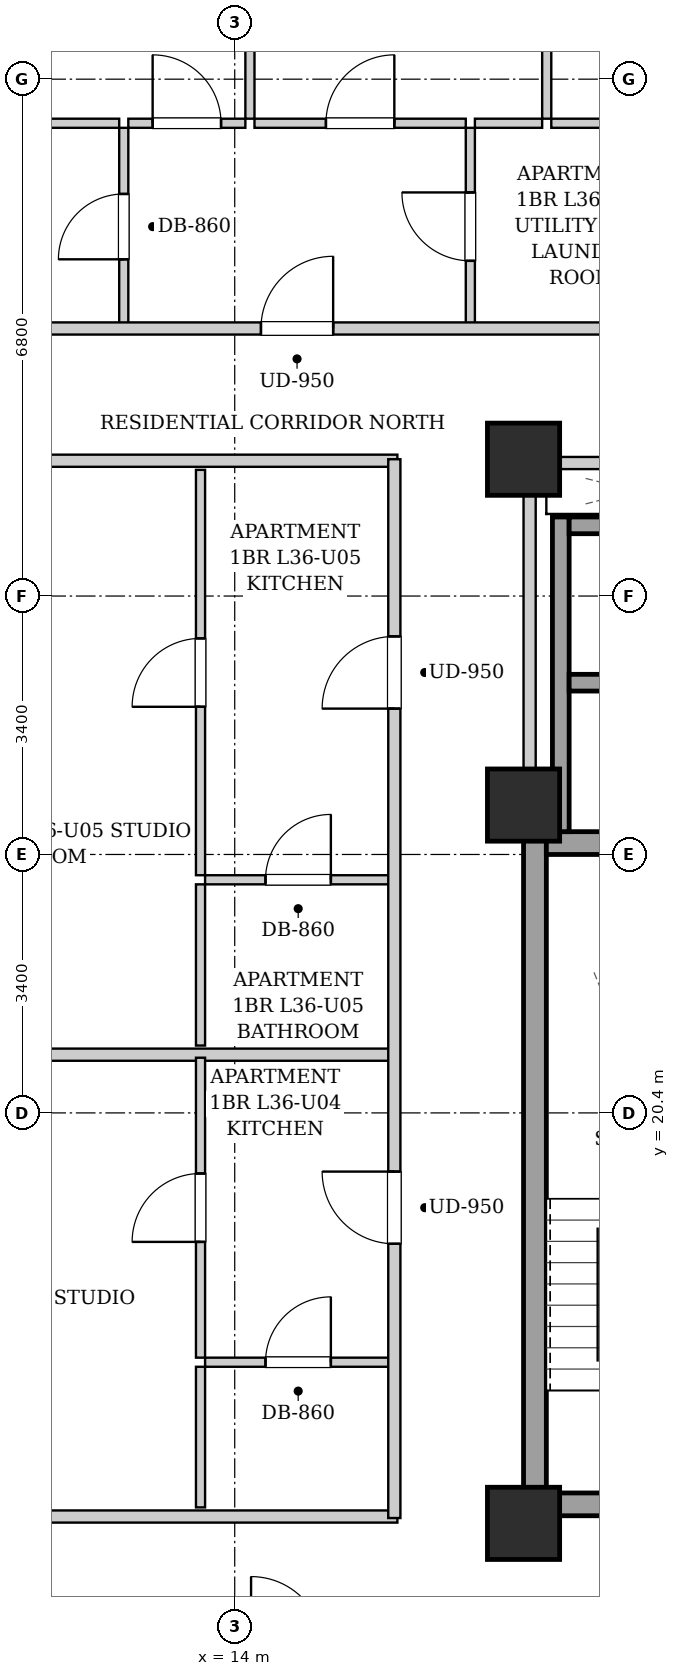
"""IFC4 building model, lengths in metres.
Left out: names, types, materials, properties, quantities, classifications, styles, units other than length and angle.
Written with IfcOpenShell. Run it as: python <this file> out.ifc"""

import sys

from ifc_helpers import new_model, si_unit, direction, frame, frame_2d, origin, origin_2d, place, context, subcontext, project, spatial, rectangle, extrude, element, fill, save


model = new_model("IFC4")
c1 = context("Model", 3, precision=1e-05, world=origin(), true_north=direction((0.0, 1.0)))
c2 = subcontext(c1, "Body", "Model", "MODEL_VIEW")
j1 = project(units=[si_unit("LENGTHUNIT", "METRE"), si_unit("PLANEANGLEUNIT", "RADIAN")], contexts=[c1])
p1 = place(None, origin())
s1 = spatial("IfcSite", under=j1, at=p1, CompositionType="ELEMENT")
p2 = place(p1, origin())
s2 = spatial("IfcBuilding", under=s1, at=p2, CompositionType="ELEMENT")
p3 = place(p2, frame((0.0, 0.0, 127.65)))
s3 = spatial("IfcBuildingStorey", under=s2, at=p3, CompositionType="ELEMENT", Elevation=127.65)
for number, where, z_axis, x_axis in (
    (1, (17.8, 15.0, 0.0), (0.0, 0.0, 1.0), (1.0, 0.0, 0.0)),
    (2, (17.8, 29.0, 0.0), (0.0, 0.0, 1.0), (1.0, 0.0, 0.0)),
    (3, (17.8, 24.45, 0.0), (0.0, 0.0, 1.0), (1.0, 0.0, 0.0)),
):
    element("IfcColumn", number, at=place(p3, frame(where, z_axis=z_axis, x_axis=x_axis)), inside=s3, PredefinedType="COLUMN", context=c2, shape_type="SweptSolid", body=[
        extrude(rectangle(XDim=0.95, YDim=0.95, at=origin_2d()), origin(), (0.0, 0.0, 1.0), 3.25),
    ])
p4 = place(p3, frame((17.95, 15.1, 0.0), z_axis=(0.0, 0.0, 1.0), x_axis=(0.0, 1.0, 0.0)))
e4 = element("IfcWall", 4, at=p4, inside=s3, PredefinedType="SHEAR", context=c2, shape_type="SweptSolid", body=[
    extrude(rectangle(XDim=9.0, YDim=0.3, at=frame_2d((4.5, 0.0))), origin(), (0.0, 0.0, 1.0), 2.99),
])
p5 = place(p3, frame((18.1, 23.95, 0.0), z_axis=(0.0, 0.0, 1.0), x_axis=(1.0, 0.0, 0.0)))
e5 = element("IfcWall", 5, at=p5, inside=s3, PredefinedType="SHEAR", context=c2, shape_type="SweptSolid", body=[
    extrude(rectangle(XDim=2.85, YDim=0.3, at=frame_2d((1.425, 0.0))), origin(), (0.0, 0.0, 1.0), 2.99),
])
p6 = place(p3, frame((18.1, 15.25, 0.0), z_axis=(0.0, 0.0, 1.0), x_axis=(1.0, 0.0, 0.0)))
e6 = element("IfcWall", 6, at=p6, inside=s3, PredefinedType="SHEAR", context=c2, shape_type="SweptSolid", body=[
    extrude(rectangle(XDim=2.85, YDim=0.3, at=frame_2d((1.425, 0.0))), origin(), (0.0, 0.0, 1.0), 2.99),
])
p7 = place(p6, frame((0.86, 0.0, 0.0)))
e7 = element("IfcOpeningElement", 7, at=p7, cuts=e6, PredefinedType="OPENING", context=c2, shape_type="SweptSolid", body=[
    extrude(rectangle(XDim=1.1, YDim=2.05, at=frame_2d((0.55, 1.025))), frame((0.0, 0.16, 0.0), z_axis=(0.0, -1.0, 0.0), x_axis=(1.0, 0.0, 0.0)), (0.0, 0.0, 1.0), 0.32),
])
p8 = place(p3, frame((18.29, 24.1, 0.0), z_axis=(0.0, 0.0, 1.0), x_axis=(0.0, 1.0, 0.0)))
e8 = element("IfcWall", 8, at=p8, inside=s3, PredefinedType="SHEAR", context=c2, shape_type="SweptSolid", body=[
    extrude(rectangle(XDim=4.14, YDim=0.22, at=frame_2d((2.07, 0.0))), origin(), (0.0, 0.0, 1.0), 2.99),
])
for number, where, z_axis, x_axis in (
    (9, (18.4, 26.06, 0.0), (0.0, 0.0, 1.0), (1.0, 0.0, 0.0)),
    (10, (18.4, 28.13, 0.0), (0.0, 0.0, 1.0), (1.0, 0.0, 0.0)),
):
    element("IfcWall", number, at=place(p3, frame(where, z_axis=z_axis, x_axis=x_axis)), inside=s3, PredefinedType="SHEAR", context=c2, shape_type="SweptSolid", body=[
        extrude(rectangle(XDim=1.9, YDim=0.22, at=frame_2d((0.95, 0.0))), origin(), (0.0, 0.0, 1.0), 2.99),
    ])
p9 = place(p3, frame((17.88, 24.12, 0.0), z_axis=(0.0, 0.0, 1.0), x_axis=(0.0, 1.0, 0.0)))
e11 = element("IfcWall", 11, at=p9, inside=s3, PredefinedType="PARTITIONING", context=c2, shape_type="SweptSolid", body=[
    extrude(rectangle(XDim=4.76, YDim=0.16, at=frame_2d((2.38, 0.0))), origin(), (0.0, 0.0, 1.0), 2.325),
])
p10 = place(p3, frame((17.96, 28.95, 0.0), z_axis=(0.0, 0.0, 1.0), x_axis=(1.0, 0.0, 0.0)))
e12 = element("IfcWall", 12, at=p10, inside=s3, PredefinedType="PARTITIONING", context=c2, shape_type="SweptSolid", body=[
    extrude(rectangle(XDim=4.29, YDim=0.16, at=frame_2d((2.145, 0.0))), origin(), (0.0, 0.0, 1.0), 2.426),
])
p11 = place(p10, frame((1.695, 0.0, 0.0)))
e13 = element("IfcOpeningElement", 13, at=p11, cuts=e12, PredefinedType="OPENING", context=c2, shape_type="SweptSolid", body=[
    extrude(rectangle(XDim=0.86, YDim=2.05, at=frame_2d((0.43, 1.025))), frame((0.0, 0.09, 0.0), z_axis=(0.0, -1.0, 0.0), x_axis=(1.0, 0.0, 0.0)), (0.0, 0.0, 1.0), 0.18),
])
for number, where, z_axis, x_axis in (
    (14, (7.78, 15.09, 0.0), (0.0, 0.0, 1.0), (1.0, 0.0, 0.0)),
    (15, (7.78, 28.98, 0.0), (0.0, 0.0, 1.0), (1.0, 0.0, 0.0)),
):
    element("IfcWall", number, at=place(p3, frame(where, z_axis=z_axis, x_axis=x_axis)), inside=s3, PredefinedType="PARTITIONING", context=c2, shape_type="SweptSolid", body=[
        extrude(rectangle(XDim=8.36, YDim=0.16, at=frame_2d((4.18, 0.0))), origin(), (0.0, 0.0, 1.0), 2.426),
    ])
p12 = place(p3, frame((12.54, 30.76, 0.0), z_axis=(0.0, 0.0, 1.0), x_axis=(0.0, 1.0, 0.0)))
e16 = element("IfcWall", 16, at=p12, inside=s3, PredefinedType="PARTITIONING", context=c2, shape_type="SweptSolid", body=[
    extrude(rectangle(XDim=2.6, YDim=0.12, at=frame_2d((1.3, 0.0))), origin(), (0.0, 0.0, 1.0), 2.99),
])
p13 = place(p12, frame((0.87, 0.0, 0.0)))
e17 = element("IfcOpeningElement", 17, at=p13, cuts=e16, PredefinedType="OPENING", context=c2, shape_type="SweptSolid", body=[
    extrude(rectangle(XDim=0.86, YDim=2.05, at=frame_2d((0.43, 1.025))), frame((0.0, 0.07, 0.0), z_axis=(0.0, -1.0, 0.0), x_axis=(1.0, 0.0, 0.0)), (0.0, 0.0, 1.0), 0.14),
])
p14 = place(p3, frame((10.08, 33.42, 0.0), z_axis=(0.0, 0.0, 1.0), x_axis=(1.0, 0.0, 0.0)))
e18 = element("IfcWall", 18, at=p14, inside=s3, PredefinedType="PARTITIONING", context=c2, shape_type="SweptSolid", body=[
    extrude(rectangle(XDim=2.4, YDim=0.12, at=frame_2d((1.2, 0.0))), origin(), (0.0, 0.0, 1.0), 2.99),
])
p15 = place(p3, frame((17.1, 30.76, 0.0), z_axis=(0.0, 0.0, 1.0), x_axis=(0.0, 1.0, 0.0)))
e19 = element("IfcWall", 19, at=p15, inside=s3, PredefinedType="PARTITIONING", context=c2, shape_type="SweptSolid", body=[
    extrude(rectangle(XDim=2.6, YDim=0.12, at=frame_2d((1.3, 0.0))), origin(), (0.0, 0.0, 1.0), 2.99),
])
p16 = place(p15, frame((0.85, 0.0, 0.0)))
e20 = element("IfcOpeningElement", 20, at=p16, cuts=e19, PredefinedType="OPENING", context=c2, shape_type="SweptSolid", body=[
    extrude(rectangle(XDim=0.9, YDim=2.05, at=frame_2d((0.45, 1.025))), frame((0.0, 0.07, 0.0), z_axis=(0.0, -1.0, 0.0), x_axis=(1.0, 0.0, 0.0)), (0.0, 0.0, 1.0), 0.14),
])
p17 = place(p3, frame((12.6, 33.42, 0.0), z_axis=(0.0, 0.0, 1.0), x_axis=(1.0, 0.0, 0.0)))
e21 = element("IfcWall", 21, at=p17, inside=s3, PredefinedType="PARTITIONING", context=c2, shape_type="SweptSolid", body=[
    extrude(rectangle(XDim=1.54, YDim=0.12, at=frame_2d((0.77, 0.0))), origin(), (0.0, 0.0, 1.0), 2.99),
])
p18 = place(p17, frame((0.32, 0.0, 0.0)))
e22 = element("IfcOpeningElement", 22, at=p18, cuts=e21, PredefinedType="OPENING", context=c2, shape_type="SweptSolid", body=[
    extrude(rectangle(XDim=0.9, YDim=2.05, at=frame_2d((0.45, 1.025))), frame((0.0, 0.07, 0.0), z_axis=(0.0, -1.0, 0.0), x_axis=(1.0, 0.0, 0.0)), (0.0, 0.0, 1.0), 0.14),
])
p19 = place(p3, frame((14.26, 33.42, 0.0), z_axis=(0.0, 0.0, 1.0), x_axis=(1.0, 0.0, 0.0)))
e23 = element("IfcWall", 23, at=p19, inside=s3, PredefinedType="PARTITIONING", context=c2, shape_type="SweptSolid", body=[
    extrude(rectangle(XDim=2.78, YDim=0.12, at=frame_2d((1.39, 0.0))), origin(), (0.0, 0.0, 1.0), 2.99),
])
p20 = place(p19, frame((0.94, 0.0, 0.0)))
e24 = element("IfcOpeningElement", 24, at=p20, cuts=e23, PredefinedType="OPENING", context=c2, shape_type="SweptSolid", body=[
    extrude(rectangle(XDim=0.9, YDim=2.05, at=frame_2d((0.45, 1.025))), frame((0.0, 0.07, 0.0), z_axis=(0.0, -1.0, 0.0), x_axis=(1.0, 0.0, 0.0)), (0.0, 0.0, 1.0), 0.14),
])
p21 = place(p3, frame((17.16, 33.42, 0.0), z_axis=(0.0, 0.0, 1.0), x_axis=(1.0, 0.0, 0.0)))
e25 = element("IfcWall", 25, at=p21, inside=s3, PredefinedType="PARTITIONING", context=c2, shape_type="SweptSolid", body=[
    extrude(rectangle(XDim=0.885, YDim=0.12, at=frame_2d((0.442, 0.0))), origin(), (0.0, 0.0, 1.0), 2.99),
])
p22 = place(p3, frame((18.165, 33.42, 0.0), z_axis=(0.0, 0.0, 1.0), x_axis=(1.0, 0.0, 0.0)))
e26 = element("IfcWall", 26, at=p22, inside=s3, PredefinedType="PARTITIONING", context=c2, shape_type="SweptSolid", body=[
    extrude(rectangle(XDim=2.595, YDim=0.12, at=frame_2d((1.297, 0.0))), origin(), (0.0, 0.0, 1.0), 2.99),
])
p23 = place(p22, frame((0.847, 0.0, 0.0)))
e27 = element("IfcOpeningElement", 27, at=p23, cuts=e26, PredefinedType="OPENING", context=c2, shape_type="SweptSolid", body=[
    extrude(rectangle(XDim=0.9, YDim=2.05, at=frame_2d((0.45, 1.025))), frame((0.0, 0.07, 0.0), z_axis=(0.0, -1.0, 0.0), x_axis=(1.0, 0.0, 0.0)), (0.0, 0.0, 1.0), 0.14),
])
p24 = place(p3, frame((14.2, 33.48, 0.0), z_axis=(0.0, 0.0, 1.0), x_axis=(0.0, 1.0, 0.0)))
e28 = element("IfcWall", 28, at=p24, inside=s3, PredefinedType="PARTITIONING", context=c2, shape_type="SweptSolid", body=[
    extrude(rectangle(XDim=9.54, YDim=0.12, at=frame_2d((4.77, 0.0))), origin(), (0.0, 0.0, 1.0), 2.99),
])
p25 = place(p24, frame((4.305, 0.0, 0.0)))
e29 = element("IfcOpeningElement", 29, at=p25, cuts=e28, PredefinedType="OPENING", context=c2, shape_type="SweptSolid", body=[
    extrude(rectangle(XDim=0.9, YDim=2.05, at=frame_2d((0.45, 1.025))), frame((0.0, 0.07, 0.0), z_axis=(0.0, -1.0, 0.0), x_axis=(1.0, 0.0, 0.0)), (0.0, 0.0, 1.0), 0.14),
])
p26 = place(p3, frame((18.105, 33.48, 0.0), z_axis=(0.0, 0.0, 1.0), x_axis=(0.0, 1.0, 0.0)))
e30 = element("IfcWall", 30, at=p26, inside=s3, PredefinedType="PARTITIONING", context=c2, shape_type="SweptSolid", body=[
    extrude(rectangle(XDim=9.54, YDim=0.12, at=frame_2d((4.77, 0.0))), origin(), (0.0, 0.0, 1.0), 2.99),
])
p27 = place(p26, frame((4.305, 0.0, 0.0)))
e31 = element("IfcOpeningElement", 31, at=p27, cuts=e30, PredefinedType="OPENING", context=c2, shape_type="SweptSolid", body=[
    extrude(rectangle(XDim=0.9, YDim=2.05, at=frame_2d((0.45, 1.025))), frame((0.0, 0.07, 0.0), z_axis=(0.0, -1.0, 0.0), x_axis=(1.0, 0.0, 0.0)), (0.0, 0.0, 1.0), 0.14),
])
p28 = place(p3, frame((7.78, 21.166, 0.0), z_axis=(0.0, 0.0, 1.0), x_axis=(1.0, 0.0, 0.0)))
e32 = element("IfcWall", 32, at=p28, inside=s3, PredefinedType="PARTITIONING", context=c2, shape_type="SweptSolid", body=[
    extrude(rectangle(XDim=8.28, YDim=0.16, at=frame_2d((4.14, 0.0))), origin(), (0.0, 0.0, 1.0), 2.99),
])
p29 = place(p3, frame((13.61, 17.12, 0.0), z_axis=(0.0, 0.0, 1.0), x_axis=(1.0, 0.0, 0.0)))
e33 = element("IfcWall", 33, at=p29, inside=s3, PredefinedType="PARTITIONING", context=c2, shape_type="SweptSolid", body=[
    extrude(rectangle(XDim=2.45, YDim=0.12, at=frame_2d((1.225, 0.0))), origin(), (0.0, 0.0, 1.0), 2.99),
])
p30 = place(p29, frame((0.795, 0.0, 0.0)))
e34 = element("IfcOpeningElement", 34, at=p30, cuts=e33, PredefinedType="OPENING", context=c2, shape_type="SweptSolid", body=[
    extrude(rectangle(XDim=0.86, YDim=2.05, at=frame_2d((0.43, 1.025))), frame((0.0, 0.07, 0.0), z_axis=(0.0, -1.0, 0.0), x_axis=(1.0, 0.0, 0.0)), (0.0, 0.0, 1.0), 0.14),
])
p31 = place(p3, frame((13.55, 15.21, 0.0), z_axis=(0.0, 0.0, 1.0), x_axis=(0.0, 1.0, 0.0)))
e35 = element("IfcWall", 35, at=p31, inside=s3, PredefinedType="PARTITIONING", context=c2, shape_type="SweptSolid", body=[
    extrude(rectangle(XDim=1.85, YDim=0.12, at=frame_2d((0.925, 0.0))), origin(), (0.0, 0.0, 1.0), 2.99),
])
p32 = place(p3, frame((13.55, 17.18, 0.0), z_axis=(0.0, 0.0, 1.0), x_axis=(0.0, 1.0, 0.0)))
e36 = element("IfcWall", 36, at=p32, inside=s3, PredefinedType="PARTITIONING", context=c2, shape_type="SweptSolid", body=[
    extrude(rectangle(XDim=3.946, YDim=0.12, at=frame_2d((1.973, 0.0))), origin(), (0.0, 0.0, 1.0), 2.99),
])
p33 = place(p32, frame((1.523, 0.0, 0.0)))
e37 = element("IfcOpeningElement", 37, at=p33, cuts=e36, PredefinedType="OPENING", context=c2, shape_type="SweptSolid", body=[
    extrude(rectangle(XDim=0.9, YDim=2.05, at=frame_2d((0.45, 1.025))), frame((0.0, 0.07, 0.0), z_axis=(0.0, -1.0, 0.0), x_axis=(1.0, 0.0, 0.0)), (0.0, 0.0, 1.0), 0.14),
])
p34 = place(p3, frame((13.61, 23.467, 0.0), z_axis=(0.0, 0.0, 1.0), x_axis=(1.0, 0.0, 0.0)))
e38 = element("IfcWall", 38, at=p34, inside=s3, PredefinedType="PARTITIONING", context=c2, shape_type="SweptSolid", body=[
    extrude(rectangle(XDim=2.45, YDim=0.12, at=frame_2d((1.225, 0.0))), origin(), (0.0, 0.0, 1.0), 2.99),
])
p35 = place(p34, frame((0.795, 0.0, 0.0)))
e39 = element("IfcOpeningElement", 39, at=p35, cuts=e38, PredefinedType="OPENING", context=c2, shape_type="SweptSolid", body=[
    extrude(rectangle(XDim=0.86, YDim=2.05, at=frame_2d((0.43, 1.025))), frame((0.0, 0.07, 0.0), z_axis=(0.0, -1.0, 0.0), x_axis=(1.0, 0.0, 0.0)), (0.0, 0.0, 1.0), 0.14),
])
p36 = place(p3, frame((13.55, 21.286, 0.0), z_axis=(0.0, 0.0, 1.0), x_axis=(0.0, 1.0, 0.0)))
e40 = element("IfcWall", 40, at=p36, inside=s3, PredefinedType="PARTITIONING", context=c2, shape_type="SweptSolid", body=[
    extrude(rectangle(XDim=2.121, YDim=0.12, at=frame_2d((1.061, 0.0))), origin(), (0.0, 0.0, 1.0), 2.99),
])
p37 = place(p3, frame((13.55, 23.527, 0.0), z_axis=(0.0, 0.0, 1.0), x_axis=(0.0, 1.0, 0.0)))
e41 = element("IfcWall", 41, at=p37, inside=s3, PredefinedType="PARTITIONING", context=c2, shape_type="SweptSolid", body=[
    extrude(rectangle(XDim=5.333, YDim=0.12, at=frame_2d((2.667, 0.0))), origin(), (0.0, 0.0, 1.0), 2.99),
])
p38 = place(p37, frame((2.216, 0.0, 0.0)))
e42 = element("IfcOpeningElement", 42, at=p38, cuts=e41, PredefinedType="OPENING", context=c2, shape_type="SweptSolid", body=[
    extrude(rectangle(XDim=0.9, YDim=2.05, at=frame_2d((0.45, 1.025))), frame((0.0, 0.07, 0.0), z_axis=(0.0, -1.0, 0.0), x_axis=(1.0, 0.0, 0.0)), (0.0, 0.0, 1.0), 0.14),
])
p39 = place(p3, frame((10.05, 30.72, 0.0), z_axis=(0.0, 0.0, 1.0), x_axis=(1.0, 0.0, 0.0)))
e43 = element("IfcWall", 43, at=p39, inside=s3, PredefinedType="PARTITIONING", context=c2, shape_type="SweptSolid", body=[
    extrude(rectangle(XDim=27.7, YDim=0.16, at=frame_2d((13.85, 0.0))), origin(), (0.0, 0.0, 1.0), 2.99),
])
p40 = place(p39, frame((4.295, 0.0, 0.0)))
e44 = element("IfcOpeningElement", 44, at=p40, cuts=e43, PredefinedType="OPENING", context=c2, shape_type="SweptSolid", body=[
    extrude(rectangle(XDim=0.95, YDim=2.1, at=frame_2d((0.475, 1.05))), frame((0.0, 0.09, 0.0), z_axis=(0.0, -1.0, 0.0), x_axis=(1.0, 0.0, 0.0)), (0.0, 0.0, 1.0), 0.18),
])
p41 = place(p39, frame((23.785, 0.0, 0.0)))
e45 = element("IfcOpeningElement", 45, at=p41, cuts=e43, PredefinedType="OPENING", context=c2, shape_type="SweptSolid", body=[
    extrude(rectangle(XDim=0.95, YDim=2.1, at=frame_2d((0.475, 1.05))), frame((0.0, 0.09, 0.0), z_axis=(0.0, -1.0, 0.0), x_axis=(1.0, 0.0, 0.0)), (0.0, 0.0, 1.0), 0.18),
])
p42 = place(p3, frame((16.1, 15.07, 0.0), z_axis=(0.0, 0.0, 1.0), x_axis=(0.0, 1.0, 0.0)))
e46 = element("IfcWall", 46, at=p42, inside=s3, PredefinedType="PARTITIONING", context=c2, shape_type="SweptSolid", body=[
    extrude(rectangle(XDim=13.93, YDim=0.16, at=frame_2d((6.965, 0.0))), origin(), (0.0, 0.0, 1.0), 2.99),
])
p43 = place(p42, frame((3.608, 0.0, 0.0)))
e47 = element("IfcOpeningElement", 47, at=p43, cuts=e46, PredefinedType="OPENING", context=c2, shape_type="SweptSolid", body=[
    extrude(rectangle(XDim=0.95, YDim=2.1, at=frame_2d((0.475, 1.05))), frame((0.0, 0.09, 0.0), z_axis=(0.0, -1.0, 0.0), x_axis=(1.0, 0.0, 0.0)), (0.0, 0.0, 1.0), 0.18),
])
p44 = place(p42, frame((10.649, 0.0, 0.0)))
e48 = element("IfcOpeningElement", 48, at=p44, cuts=e46, PredefinedType="OPENING", context=c2, shape_type="SweptSolid", body=[
    extrude(rectangle(XDim=0.95, YDim=2.1, at=frame_2d((0.475, 1.05))), frame((0.0, 0.09, 0.0), z_axis=(0.0, -1.0, 0.0), x_axis=(1.0, 0.0, 0.0)), (0.0, 0.0, 1.0), 0.18),
])
p45 = place(p13, origin())
e49 = element("IfcDoor", 49, at=p45, inside=s3, OperationType="SINGLE_SWING_LEFT", PredefinedType="DOOR", context=c2, shape_type="SweptSolid", body=[
    extrude(rectangle(XDim=0.86, YDim=2.05, at=frame_2d((0.43, 1.025))), frame((0.0, 0.025, 0.0), z_axis=(0.0, -1.0, 0.0), x_axis=(1.0, 0.0, 0.0)), (0.0, 0.0, 1.0), 0.05),
])
fill(e17, e49)
p46 = place(p16, origin())
e50 = element("IfcDoor", 50, at=p46, inside=s3, OperationType="SINGLE_SWING_RIGHT", PredefinedType="DOOR", context=c2, shape_type="SweptSolid", body=[
    extrude(rectangle(XDim=0.9, YDim=2.05, at=frame_2d((0.45, 1.025))), frame((0.0, 0.025, 0.0), z_axis=(0.0, -1.0, 0.0), x_axis=(1.0, 0.0, 0.0)), (0.0, 0.0, 1.0), 0.05),
])
fill(e20, e50)
p47 = place(p18, origin())
e51 = element("IfcDoor", 51, at=p47, inside=s3, OperationType="SINGLE_SWING_LEFT", PredefinedType="DOOR", context=c2, shape_type="SweptSolid", body=[
    extrude(rectangle(XDim=0.9, YDim=2.05, at=frame_2d((0.45, 1.025))), frame((0.0, 0.025, 0.0), z_axis=(0.0, -1.0, 0.0), x_axis=(1.0, 0.0, 0.0)), (0.0, 0.0, 1.0), 0.05),
])
fill(e22, e51)
p48 = place(p20, origin())
e52 = element("IfcDoor", 52, at=p48, inside=s3, OperationType="SINGLE_SWING_RIGHT", PredefinedType="DOOR", context=c2, shape_type="SweptSolid", body=[
    extrude(rectangle(XDim=0.9, YDim=2.05, at=frame_2d((0.45, 1.025))), frame((0.0, 0.025, 0.0), z_axis=(0.0, -1.0, 0.0), x_axis=(1.0, 0.0, 0.0)), (0.0, 0.0, 1.0), 0.05),
])
fill(e24, e52)
p49 = place(p30, origin())
e53 = element("IfcDoor", 53, at=p49, inside=s3, OperationType="SINGLE_SWING_RIGHT", PredefinedType="DOOR", context=c2, shape_type="SweptSolid", body=[
    extrude(rectangle(XDim=0.86, YDim=2.05, at=frame_2d((0.43, 1.025))), frame((0.0, 0.025, 0.0), z_axis=(0.0, -1.0, 0.0), x_axis=(1.0, 0.0, 0.0)), (0.0, 0.0, 1.0), 0.05),
])
fill(e34, e53)
p50 = place(p33, origin())
e54 = element("IfcDoor", 54, at=p50, inside=s3, OperationType="SINGLE_SWING_LEFT", PredefinedType="DOOR", context=c2, shape_type="SweptSolid", body=[
    extrude(rectangle(XDim=0.9, YDim=2.05, at=frame_2d((0.45, 1.025))), frame((0.0, 0.025, 0.0), z_axis=(0.0, -1.0, 0.0), x_axis=(1.0, 0.0, 0.0)), (0.0, 0.0, 1.0), 0.05),
])
fill(e37, e54)
p51 = place(p35, origin())
e55 = element("IfcDoor", 55, at=p51, inside=s3, OperationType="SINGLE_SWING_RIGHT", PredefinedType="DOOR", context=c2, shape_type="SweptSolid", body=[
    extrude(rectangle(XDim=0.86, YDim=2.05, at=frame_2d((0.43, 1.025))), frame((0.0, 0.025, 0.0), z_axis=(0.0, -1.0, 0.0), x_axis=(1.0, 0.0, 0.0)), (0.0, 0.0, 1.0), 0.05),
])
fill(e39, e55)
p52 = place(p38, origin())
e56 = element("IfcDoor", 56, at=p52, inside=s3, OperationType="SINGLE_SWING_LEFT", PredefinedType="DOOR", context=c2, shape_type="SweptSolid", body=[
    extrude(rectangle(XDim=0.9, YDim=2.05, at=frame_2d((0.45, 1.025))), frame((0.0, 0.025, 0.0), z_axis=(0.0, -1.0, 0.0), x_axis=(1.0, 0.0, 0.0)), (0.0, 0.0, 1.0), 0.05),
])
fill(e42, e56)
p53 = place(p40, origin())
e57 = element("IfcDoor", 57, at=p53, inside=s3, OperationType="SINGLE_SWING_RIGHT", PredefinedType="DOOR", context=c2, shape_type="SweptSolid", body=[
    extrude(rectangle(XDim=0.95, YDim=2.1, at=frame_2d((0.475, 1.05))), frame((0.0, 0.025, 0.0), z_axis=(0.0, -1.0, 0.0), x_axis=(1.0, 0.0, 0.0)), (0.0, 0.0, 1.0), 0.05),
])
fill(e44, e57)
p54 = place(p43, origin())
e58 = element("IfcDoor", 58, at=p54, inside=s3, OperationType="SINGLE_SWING_RIGHT", PredefinedType="DOOR", context=c2, shape_type="SweptSolid", body=[
    extrude(rectangle(XDim=0.95, YDim=2.1, at=frame_2d((0.475, 1.05))), frame((0.0, 0.025, 0.0), z_axis=(0.0, -1.0, 0.0), x_axis=(1.0, 0.0, 0.0)), (0.0, 0.0, 1.0), 0.05),
])
fill(e47, e58)
p55 = place(p44, origin())
e59 = element("IfcDoor", 59, at=p55, inside=s3, OperationType="SINGLE_SWING_LEFT", PredefinedType="DOOR", context=c2, shape_type="SweptSolid", body=[
    extrude(rectangle(XDim=0.95, YDim=2.1, at=frame_2d((0.475, 1.05))), frame((0.0, 0.025, 0.0), z_axis=(0.0, -1.0, 0.0), x_axis=(1.0, 0.0, 0.0)), (0.0, 0.0, 1.0), 0.05),
])
fill(e48, e59)
save(model, sys.argv[1])
